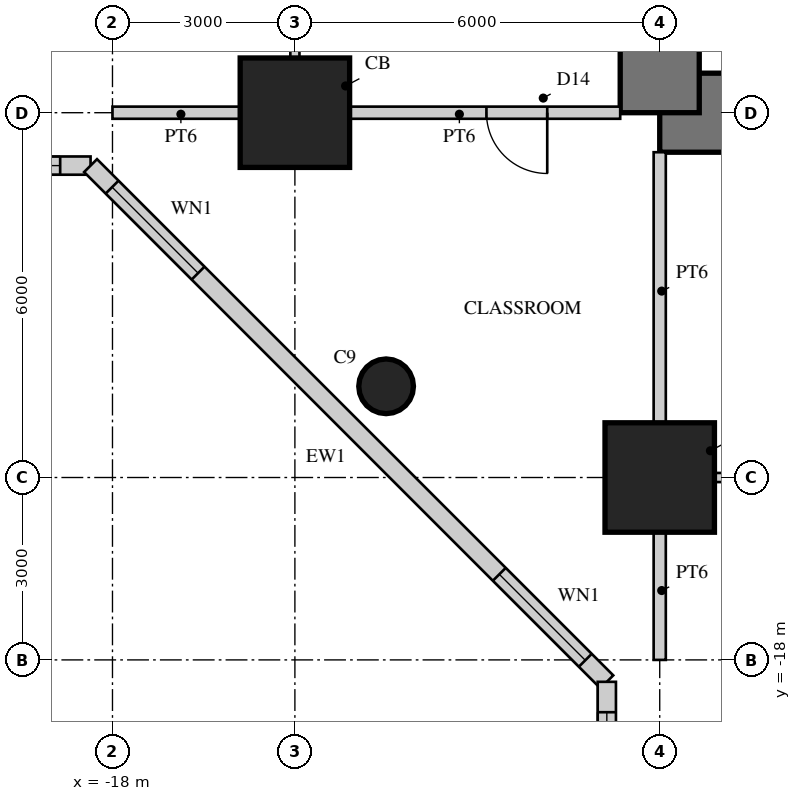
"""IFC4 building model, lengths in metres.
Left out: names, types, materials, properties, quantities, classifications, styles, units other than length and angle.
Written with IfcOpenShell. Run it as: python <this file> out.ifc"""

import sys

from ifc_helpers import new_model, si_unit, direction, frame, frame_2d, origin, origin_2d, place, context, subcontext, project, spatial, rectangle, hollow_rectangle, circle, extrude, element, fill, save


model = new_model("IFC4")
c1 = context("Model", 3, precision=1e-05, world=origin(), true_north=direction((0.0, 1.0)))
c2 = subcontext(c1, "Body", "Model", "MODEL_VIEW")
j1 = project(units=[si_unit("LENGTHUNIT", "METRE"), si_unit("PLANEANGLEUNIT", "RADIAN")], contexts=[c1])
p1 = place(None, origin())
s1 = spatial("IfcSite", under=j1, at=p1, CompositionType="ELEMENT")
p2 = place(p1, origin())
s2 = spatial("IfcBuilding", under=s1, at=p2, CompositionType="ELEMENT")
p3 = place(p2, frame((0.0, 0.0, 9.5)))
s3 = spatial("IfcBuildingStorey", under=s2, at=p3, CompositionType="ELEMENT", Elevation=9.5)
p4 = place(p3, frame((-9.0, -9.0, 0.0), z_axis=(0.0, 0.0, 1.0), x_axis=(1.0, 0.0, 0.0)))
e1 = element("IfcWall", 1, at=p4, inside=s3, PredefinedType="SHEAR", context=c2, shape_type="SweptSolid", body=[
    extrude(rectangle(XDim=18.0, YDim=1.3, at=frame_2d((9.0, 0.0))), origin(), (0.0, 0.0, 1.0), 4.5),
])
p5 = place(p4, frame((9.8, 0.0, 0.0)))
e2 = element("IfcOpeningElement", 2, at=p5, cuts=e1, PredefinedType="OPENING", context=c2, shape_type="SweptSolid", body=[
    extrude(rectangle(XDim=1.0, YDim=2.4, at=frame_2d((0.5, 1.2))), frame((0.0, 0.66, 0.0), z_axis=(0.0, -1.0, 0.0), x_axis=(1.0, 0.0, 0.0)), (0.0, 0.0, 1.0), 1.32),
])
p6 = place(p3, frame((-9.0, 9.0, 0.0), z_axis=(0.0, 0.0, 1.0), x_axis=(0.0, -1.0, 0.0)))
e3 = element("IfcWall", 3, at=p6, inside=s3, PredefinedType="SHEAR", context=c2, shape_type="SweptSolid", body=[
    extrude(rectangle(XDim=18.0, YDim=1.3, at=frame_2d((9.0, 0.0))), origin(), (0.0, 0.0, 1.0), 4.5),
])
p7 = place(p6, frame((9.8, 0.0, 0.0)))
e4 = element("IfcOpeningElement", 4, at=p7, cuts=e3, PredefinedType="OPENING", context=c2, shape_type="SweptSolid", body=[
    extrude(rectangle(XDim=1.0, YDim=2.4, at=frame_2d((0.5, 1.2))), frame((0.0, 0.66, 0.0), z_axis=(0.0, -1.0, 0.0), x_axis=(1.0, 0.0, 0.0)), (0.0, 0.0, 1.0), 1.32),
])
for number, where, z_axis, x_axis in (
    (5, (-9.0, -15.0, 0.0), (0.0, 0.0, 1.0), (1.0, 0.0, 0.0)),
    (6, (-15.0, -9.0, 0.0), (0.0, 0.0, 1.0), (1.0, 0.0, 0.0)),
):
    element("IfcColumn", number, at=place(p3, frame(where, z_axis=z_axis, x_axis=x_axis)), inside=s3, PredefinedType="COLUMN", context=c2, shape_type="SweptSolid", body=[
        extrude(rectangle(XDim=1.8, YDim=1.8, at=origin_2d()), origin(), (0.0, 0.0, 1.0), 4.5),
    ])
p8 = place(p3, frame((-13.5, -13.5, 0.0), z_axis=(0.0, 0.0, 1.0), x_axis=(1.0, 0.0, 0.0)))
e7 = element("IfcColumn", 7, at=p8, inside=s3, PredefinedType="COLUMN", context=c2, shape_type="SweptSolid", body=[
    extrude(circle(Radius=0.45, at=origin_2d()), origin(), (0.0, 0.0, 1.0), 4.5),
])
p9 = place(p3, frame((-24.36, -9.87, 0.0), z_axis=(0.0, 0.0, 1.0), x_axis=(1.0, 0.0, 0.0)))
e8 = element("IfcWall", 8, at=p9, inside=s3, PredefinedType="SOLIDWALL", context=c2, shape_type="SweptSolid", body=[
    extrude(rectangle(XDim=6.0, YDim=0.3, at=frame_2d((3.0, 0.0))), origin(), (0.0, 0.0, 1.0), 4.3),
])
p10 = place(p9, frame((3.5, 0.0, 0.9)))
e9 = element("IfcOpeningElement", 9, at=p10, cuts=e8, PredefinedType="OPENING", context=c2, shape_type="SweptSolid", body=[
    extrude(rectangle(XDim=2.0, YDim=1.8, at=frame_2d((1.0, 0.9))), frame((0.0, 0.16, 0.0), z_axis=(0.0, -1.0, 0.0), x_axis=(1.0, 0.0, 0.0)), (0.0, 0.0, 1.0), 0.32),
])
p11 = place(p3, frame((-18.36, -9.87, 0.0), z_axis=(0.0, 0.0, 1.0), x_axis=(0.707106781187, -0.707106781187, 0.0)))
e10 = element("IfcWall", 10, at=p11, inside=s3, PredefinedType="SOLIDWALL", context=c2, shape_type="SweptSolid", body=[
    extrude(rectangle(XDim=12.007, YDim=0.3, at=frame_2d((6.003, 0.0))), origin(), (0.0, 0.0, 1.0), 4.3),
])
p12 = place(p11, frame((0.501, 0.0, 0.9)))
e11 = element("IfcOpeningElement", 11, at=p12, cuts=e10, PredefinedType="OPENING", context=c2, shape_type="SweptSolid", body=[
    extrude(rectangle(XDim=2.0, YDim=1.8, at=frame_2d((1.0, 0.9))), frame((0.0, 0.16, 0.0), z_axis=(0.0, -1.0, 0.0), x_axis=(1.0, 0.0, 0.0)), (0.0, 0.0, 1.0), 0.32),
])
p13 = place(p11, frame((9.506, 0.0, 0.9)))
e12 = element("IfcOpeningElement", 12, at=p13, cuts=e10, PredefinedType="OPENING", context=c2, shape_type="SweptSolid", body=[
    extrude(rectangle(XDim=2.0, YDim=1.8, at=frame_2d((1.0, 0.9))), frame((0.0, 0.16, 0.0), z_axis=(0.0, -1.0, 0.0), x_axis=(1.0, 0.0, 0.0)), (0.0, 0.0, 1.0), 0.32),
])
p14 = place(p3, frame((-9.87, -18.36, 0.0), z_axis=(0.0, 0.0, 1.0), x_axis=(0.0, -1.0, 0.0)))
e13 = element("IfcWall", 13, at=p14, inside=s3, PredefinedType="SOLIDWALL", context=c2, shape_type="SweptSolid", body=[
    extrude(rectangle(XDim=6.0, YDim=0.3, at=frame_2d((3.0, 0.0))), origin(), (0.0, 0.0, 1.0), 4.3),
])
p15 = place(p14, frame((0.5, 0.0, 0.9)))
e14 = element("IfcOpeningElement", 14, at=p15, cuts=e13, PredefinedType="OPENING", context=c2, shape_type="SweptSolid", body=[
    extrude(rectangle(XDim=2.0, YDim=1.8, at=frame_2d((1.0, 0.9))), frame((0.0, 0.16, 0.0), z_axis=(0.0, -1.0, 0.0), x_axis=(1.0, 0.0, 0.0)), (0.0, 0.0, 1.0), 0.32),
])
p16 = place(p3, frame((-8.25, -15.0, 0.0), z_axis=(0.0, 0.0, 1.0), x_axis=(1.0, 0.0, 0.0)))
e15 = element("IfcWall", 15, at=p16, inside=s3, PredefinedType="PARTITIONING", context=c2, shape_type="SweptSolid", body=[
    extrude(rectangle(XDim=7.45, YDim=0.15, at=frame_2d((3.725, 0.0))), origin(), (0.0, 0.0, 1.0), 3.35),
])
p17 = place(p3, frame((-15.0, -2.575, 0.0), z_axis=(0.0, 0.0, 1.0), x_axis=(0.0, -1.0, 0.0)))
e16 = element("IfcWall", 16, at=p17, inside=s3, PredefinedType="PARTITIONING", context=c2, shape_type="SweptSolid", body=[
    extrude(rectangle(XDim=5.675, YDim=0.15, at=frame_2d((2.837, 0.0))), origin(), (0.0, 0.0, 1.0), 3.35),
])
p18 = place(p3, frame((-9.65, -9.0, 0.0), z_axis=(0.0, 0.0, 1.0), x_axis=(-1.0, 0.0, 0.0)))
e17 = element("IfcWall", 17, at=p18, inside=s3, PredefinedType="SOLIDWALL", context=c2, shape_type="SweptSolid", body=[
    extrude(rectangle(XDim=4.6, YDim=0.2, at=frame_2d((2.3, 0.0))), origin(), (0.0, 0.0, 1.0), 3.3),
])
p19 = place(p18, frame((1.2, 0.0, 0.0)))
e18 = element("IfcOpeningElement", 18, at=p19, cuts=e17, PredefinedType="OPENING", context=c2, shape_type="SweptSolid", body=[
    extrude(rectangle(XDim=1.0, YDim=2.2, at=frame_2d((0.5, 1.1))), frame((0.0, 0.11, 0.0), z_axis=(0.0, -1.0, 0.0), x_axis=(1.0, 0.0, 0.0)), (0.0, 0.0, 1.0), 0.22),
])
p20 = place(p3, frame((-15.75, -9.0, 0.0), z_axis=(0.0, 0.0, 1.0), x_axis=(-1.0, 0.0, 0.0)))
e19 = element("IfcWall", 19, at=p20, inside=s3, PredefinedType="SOLIDWALL", context=c2, shape_type="SweptSolid", body=[
    extrude(rectangle(XDim=2.25, YDim=0.2, at=frame_2d((1.125, 0.0))), origin(), (0.0, 0.0, 1.0), 3.3),
])
p21 = place(p3, frame((-9.0, -14.25, 0.0), z_axis=(0.0, 0.0, 1.0), x_axis=(0.0, 1.0, 0.0)))
e20 = element("IfcWall", 20, at=p21, inside=s3, PredefinedType="SOLIDWALL", context=c2, shape_type="SweptSolid", body=[
    extrude(rectangle(XDim=4.6, YDim=0.2, at=frame_2d((2.3, 0.0))), origin(), (0.0, 0.0, 1.0), 3.3),
])
p22 = place(p3, frame((-9.0, -18.0, 0.0), z_axis=(0.0, 0.0, 1.0), x_axis=(0.0, 1.0, 0.0)))
e21 = element("IfcWall", 21, at=p22, inside=s3, PredefinedType="SOLIDWALL", context=c2, shape_type="SweptSolid", body=[
    extrude(rectangle(XDim=2.25, YDim=0.2, at=frame_2d((1.125, 0.0))), origin(), (0.0, 0.0, 1.0), 3.3),
])
p23 = place(p10, origin())
e22 = element("IfcWindow", 22, at=p23, inside=s3, PartitioningType="SINGLE_PANEL", PredefinedType="WINDOW", context=c2, shape_type="SweptSolid", body=[
    extrude(hollow_rectangle(XDim=2.0, YDim=1.8, WallThickness=0.06, at=frame_2d((1.0, 0.9))), frame((0.0, 0.03, 0.0), z_axis=(0.0, -1.0, 0.0), x_axis=(1.0, 0.0, 0.0)), (0.0, 0.0, 1.0), 0.06),
    extrude(rectangle(XDim=1.879, YDim=1.679, at=frame_2d((1.0, 0.9))), frame((0.0, 0.03, 0.0), z_axis=(0.0, -1.0, 0.0), x_axis=(1.0, 0.0, 0.0)), (0.0, 0.0, 1.0), 0.06),
])
fill(e9, e22)
p24 = place(p12, origin())
e23 = element("IfcWindow", 23, at=p24, inside=s3, PartitioningType="SINGLE_PANEL", PredefinedType="WINDOW", context=c2, shape_type="SweptSolid", body=[
    extrude(hollow_rectangle(XDim=2.0, YDim=1.8, WallThickness=0.06, at=frame_2d((1.0, 0.9))), frame((0.0, 0.03, 0.0), z_axis=(0.0, -1.0, 0.0), x_axis=(1.0, 0.0, 0.0)), (0.0, 0.0, 1.0), 0.06),
    extrude(rectangle(XDim=1.879, YDim=1.679, at=frame_2d((1.0, 0.9))), frame((0.0, 0.03, 0.0), z_axis=(0.0, -1.0, 0.0), x_axis=(1.0, 0.0, 0.0)), (0.0, 0.0, 1.0), 0.06),
])
fill(e11, e23)
p25 = place(p13, origin())
e24 = element("IfcWindow", 24, at=p25, inside=s3, PartitioningType="SINGLE_PANEL", PredefinedType="WINDOW", context=c2, shape_type="SweptSolid", body=[
    extrude(hollow_rectangle(XDim=2.0, YDim=1.8, WallThickness=0.06, at=frame_2d((1.0, 0.9))), frame((0.0, 0.03, 0.0), z_axis=(0.0, -1.0, 0.0), x_axis=(1.0, 0.0, 0.0)), (0.0, 0.0, 1.0), 0.06),
    extrude(rectangle(XDim=1.879, YDim=1.679, at=frame_2d((1.0, 0.9))), frame((0.0, 0.03, 0.0), z_axis=(0.0, -1.0, 0.0), x_axis=(1.0, 0.0, 0.0)), (0.0, 0.0, 1.0), 0.06),
])
fill(e12, e24)
p26 = place(p15, origin())
e25 = element("IfcWindow", 25, at=p26, inside=s3, PartitioningType="SINGLE_PANEL", PredefinedType="WINDOW", context=c2, shape_type="SweptSolid", body=[
    extrude(hollow_rectangle(XDim=2.0, YDim=1.8, WallThickness=0.06, at=frame_2d((1.0, 0.9))), frame((0.0, 0.03, 0.0), z_axis=(0.0, -1.0, 0.0), x_axis=(1.0, 0.0, 0.0)), (0.0, 0.0, 1.0), 0.06),
    extrude(rectangle(XDim=1.879, YDim=1.679, at=frame_2d((1.0, 0.9))), frame((0.0, 0.03, 0.0), z_axis=(0.0, -1.0, 0.0), x_axis=(1.0, 0.0, 0.0)), (0.0, 0.0, 1.0), 0.06),
])
fill(e14, e25)
p27 = place(p19, origin())
e26 = element("IfcDoor", 26, at=p27, inside=s3, OperationType="SINGLE_SWING_LEFT", PredefinedType="DOOR", context=c2, shape_type="SweptSolid", body=[
    extrude(rectangle(XDim=1.0, YDim=2.2, at=frame_2d((0.5, 1.1))), frame((0.0, 0.025, 0.0), z_axis=(0.0, -1.0, 0.0), x_axis=(1.0, 0.0, 0.0)), (0.0, 0.0, 1.0), 0.05),
])
fill(e18, e26)
save(model, sys.argv[1])
